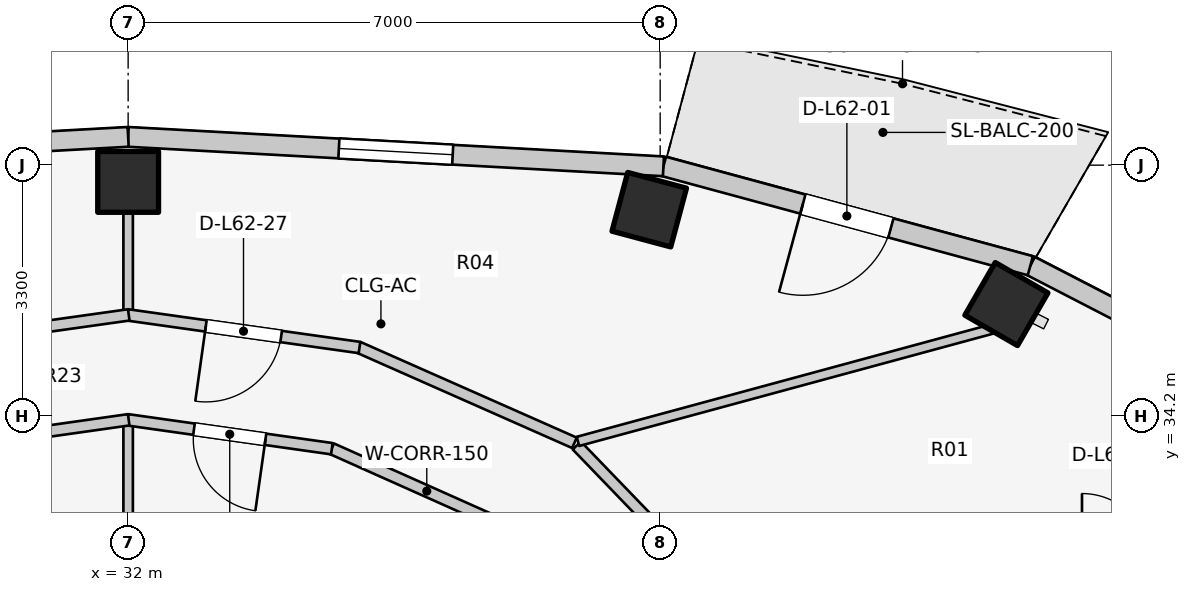
"""IFC4 building model, lengths in metres.
Left out: names, types, materials, properties, quantities, classifications, styles, units other than length and angle.
Written with IfcOpenShell. Run it as: python <this file> out.ifc"""

import sys

from ifc_helpers import new_model, si_unit, direction, frame, frame_2d, origin, origin_2d, place, context, subcontext, project, spatial, rectangle, extrude, element, fill, save


model = new_model("IFC4")
c1 = context("Model", 3, precision=1e-05, world=origin(), true_north=direction((0.0, 1.0)))
c2 = subcontext(c1, "Body", "Model", "MODEL_VIEW")
j1 = project(units=[si_unit("LENGTHUNIT", "METRE"), si_unit("PLANEANGLEUNIT", "RADIAN")], contexts=[c1])
p1 = place(None, origin())
s1 = spatial("IfcSite", under=j1, at=p1, CompositionType="ELEMENT")
p2 = place(p1, origin())
s2 = spatial("IfcBuilding", under=s1, at=p2, CompositionType="ELEMENT")
p3 = place(p2, frame((0.0, 0.0, 204.7)))
s3 = spatial("IfcBuildingStorey", under=s2, at=p3, CompositionType="ELEMENT", Elevation=204.7)
for number, where, z_axis, x_axis in (
    (1, (43.555, 35.673, 0.0), (0.0, 0.0, 1.0), (0.5, 0.866, 0.0)),
    (2, (38.856, 36.914, 0.0), (0.0, 0.0, 1.0), (0.259, 0.966, 0.0)),
    (3, (32.0, 37.28, 0.0), (0.0, 0.0, 1.0), (0.0, 1.0, 0.0)),
):
    element("IfcColumn", number, at=place(p3, frame(where, z_axis=z_axis, x_axis=x_axis)), inside=s3, PredefinedType="COLUMN", context=c2, shape_type="SweptSolid", body=[
        extrude(rectangle(XDim=0.8, YDim=0.8, at=origin_2d()), origin(), (0.0, 0.0, 1.0), 3.1),
    ])
p4 = place(p3, frame((47.558, 34.272, 0.0), z_axis=(0.0, 0.0, 1.0), x_axis=(-0.88849146803, 0.458893137057, 0.0)))
e4 = element("IfcWall", 4, at=p4, inside=s3, PredefinedType="STANDARD", context=c2, shape_type="SweptSolid", body=[
    extrude(rectangle(XDim=4.15, YDim=0.26, at=frame_2d((2.075, 0.0))), origin(), (0.0, 0.0, 1.0), 2.85),
])
p5 = place(p3, frame((43.87, 36.177, 0.0), z_axis=(0.0, 0.0, 1.0), x_axis=(-0.965213026382, 0.261464746576, 0.0)))
e5 = element("IfcWall", 5, at=p5, inside=s3, PredefinedType="STANDARD", context=c2, shape_type="SweptSolid", body=[
    extrude(rectangle(XDim=5.001, YDim=0.26, at=frame_2d((2.5, 0.0))), origin(), (0.0, 0.0, 1.0), 2.88),
])
p6 = place(p5, frame((1.9, 0.0, 0.0)))
e6 = element("IfcOpeningElement", 6, at=p6, cuts=e5, PredefinedType="OPENING", context=c2, shape_type="SweptSolid", body=[
    extrude(rectangle(XDim=1.2, YDim=2.2, at=frame_2d((0.6, 1.1))), frame((0.0, 0.14, 0.0), z_axis=(0.0, -1.0, 0.0), x_axis=(1.0, 0.0, 0.0)), (0.0, 0.0, 1.0), 0.28),
])
p7 = place(p3, frame((39.043, 37.485, 0.0), z_axis=(0.0, 0.0, 1.0), x_axis=(-0.998490239527, 0.054929423535, 0.0)))
e7 = element("IfcWall", 7, at=p7, inside=s3, PredefinedType="STANDARD", context=c2, shape_type="SweptSolid", body=[
    extrude(rectangle(XDim=7.054, YDim=0.26, at=frame_2d((3.527, 0.0))), origin(), (0.0, 0.0, 1.0), 2.85),
])
p8 = place(p7, frame((2.777, 0.0, 0.75)))
e8 = element("IfcOpeningElement", 8, at=p8, cuts=e7, PredefinedType="OPENING", context=c2, shape_type="SweptSolid", body=[
    extrude(rectangle(XDim=1.5, YDim=1.6, at=frame_2d((0.75, 0.8))), frame((0.0, 0.14, 0.0), z_axis=(0.0, -1.0, 0.0), x_axis=(1.0, 0.0, 0.0)), (0.0, 0.0, 1.0), 0.28),
])
p9 = place(p3, frame((32.0, 37.872, 0.0), z_axis=(0.0, 0.0, 1.0), x_axis=(-0.998490239527, -0.054929423535, 0.0)))
e9 = element("IfcWall", 9, at=p9, inside=s3, PredefinedType="STANDARD", context=c2, shape_type="SweptSolid", body=[
    extrude(rectangle(XDim=7.054, YDim=0.26, at=frame_2d((3.527, 0.0))), origin(), (0.0, 0.0, 1.0), 2.85),
])
p10 = place(p9, frame((2.777, 0.0, 0.75)))
e10 = element("IfcOpeningElement", 10, at=p10, cuts=e9, PredefinedType="OPENING", context=c2, shape_type="SweptSolid", body=[
    extrude(rectangle(XDim=1.5, YDim=1.6, at=frame_2d((0.75, 0.8))), frame((0.0, 0.14, 0.0), z_axis=(0.0, -1.0, 0.0), x_axis=(1.0, 0.0, 0.0)), (0.0, 0.0, 1.0), 0.28),
])
p11 = place(p3, frame((32.0, 31.1, 0.0), z_axis=(0.0, 0.0, 1.0), x_axis=(0.0, 1.0, 0.0)))
e11 = element("IfcWall", 11, at=p11, inside=s3, PredefinedType="PARTITIONING", context=c2, shape_type="SweptSolid", body=[
    extrude(rectangle(XDim=3.05, YDim=0.125, at=frame_2d((1.525, 0.0))), origin(), (0.0, 0.0, 1.0), 2.376),
])
p12 = place(p3, frame((37.181, 32.652, 0.0), z_axis=(0.0, 0.0, 1.0), x_axis=(-0.913120130558, 0.407690602257, 0.0)))
e12 = element("IfcWall", 12, at=p12, inside=s3, PredefinedType="PARTITIONING", context=c2, shape_type="SweptSolid", body=[
    extrude(rectangle(XDim=2.743, YDim=0.15, at=frame_2d((1.371, 0.0))), origin(), (0.0, 0.0, 1.0), 2.376),
])
p13 = place(p3, frame((34.68, 33.77, 0.0), z_axis=(0.0, 0.0, 1.0), x_axis=(-0.990132151456, 0.140136799779, 0.0)))
e13 = element("IfcWall", 13, at=p13, inside=s3, PredefinedType="PARTITIONING", context=c2, shape_type="SweptSolid", body=[
    extrude(rectangle(XDim=2.714, YDim=0.15, at=frame_2d((1.357, 0.0))), origin(), (0.0, 0.0, 1.0), 2.376),
])
p14 = place(p13, frame((0.882, 0.0, 0.0)))
e14 = element("IfcOpeningElement", 14, at=p14, cuts=e13, PredefinedType="OPENING", context=c2, shape_type="SweptSolid", body=[
    extrude(rectangle(XDim=0.95, YDim=2.1, at=frame_2d((0.475, 1.05))), frame((0.0, 0.085, 0.0), z_axis=(0.0, -1.0, 0.0), x_axis=(1.0, 0.0, 0.0)), (0.0, 0.0, 1.0), 0.17),
])
p15 = place(p3, frame((32.007, 34.15, 0.0), z_axis=(0.0, 0.0, 1.0), x_axis=(-0.990132151456, -0.140136799779, 0.0)))
e15 = element("IfcWall", 15, at=p15, inside=s3, PredefinedType="PARTITIONING", context=c2, shape_type="SweptSolid", body=[
    extrude(rectangle(XDim=2.714, YDim=0.15, at=frame_2d((1.357, 0.0))), origin(), (0.0, 0.0, 1.0), 2.376),
])
p16 = place(p3, frame((37.903, 33.812, 0.0), z_axis=(0.0, 0.0, 1.0), x_axis=(0.694032962553, -0.719943224768, 0.0)))
e16 = element("IfcWall", 16, at=p16, inside=s3, PredefinedType="PARTITIONING", context=c2, shape_type="SweptSolid", body=[
    extrude(rectangle(XDim=2.158, YDim=0.15, at=frame_2d((1.079, 0.0))), origin(), (0.0, 0.0, 1.0), 2.376),
])
p17 = place(p3, frame((37.918, 33.866, 0.0), z_axis=(0.0, 0.0, 1.0), x_axis=(0.965109390289, 0.261847025523, 0.0)))
e17 = element("IfcWall", 17, at=p17, inside=s3, PredefinedType="PARTITIONING", context=c2, shape_type="SweptSolid", body=[
    extrude(rectangle(XDim=5.644, YDim=0.125, at=frame_2d((2.822, 0.0))), origin(), (0.0, 0.0, 1.0), 2.376),
])
p18 = place(p3, frame((32.0, 35.585, 0.0), z_axis=(0.0, 0.0, 1.0), x_axis=(0.0, 1.0, 0.0)))
e18 = element("IfcWall", 18, at=p18, inside=s3, PredefinedType="PARTITIONING", context=c2, shape_type="SweptSolid", body=[
    extrude(rectangle(XDim=1.315, YDim=0.125, at=frame_2d((0.657, 0.0))), origin(), (0.0, 0.0, 1.0), 2.376),
])
p19 = place(p3, frame((37.872, 33.847, 0.0), z_axis=(0.0, 0.0, 1.0), x_axis=(-0.914490094652, 0.40460828808, 0.0)))
e19 = element("IfcWall", 19, at=p19, inside=s3, PredefinedType="PARTITIONING", context=c2, shape_type="SweptSolid", body=[
    extrude(rectangle(XDim=3.11, YDim=0.15, at=frame_2d((1.555, 0.0))), origin(), (0.0, 0.0, 1.0), 2.376),
])
p20 = place(p3, frame((35.044, 35.101, 0.0), z_axis=(0.0, 0.0, 1.0), x_axis=(-0.990257602807, 0.139247549651, 0.0)))
e20 = element("IfcWall", 20, at=p20, inside=s3, PredefinedType="PARTITIONING", context=c2, shape_type="SweptSolid", body=[
    extrude(rectangle(XDim=3.082, YDim=0.15, at=frame_2d((1.541, 0.0))), origin(), (0.0, 0.0, 1.0), 2.376),
])
p21 = place(p20, frame((1.041, 0.0, 0.0)))
e21 = element("IfcOpeningElement", 21, at=p21, cuts=e20, PredefinedType="OPENING", context=c2, shape_type="SweptSolid", body=[
    extrude(rectangle(XDim=1.0, YDim=2.1, at=frame_2d((0.5, 1.05))), frame((0.0, 0.085, 0.0), z_axis=(0.0, -1.0, 0.0), x_axis=(1.0, 0.0, 0.0)), (0.0, 0.0, 1.0), 0.17),
])
p22 = place(p3, frame((32.008, 35.53, 0.0), z_axis=(0.0, 0.0, 1.0), x_axis=(-0.990257602807, -0.139247549651, 0.0)))
e22 = element("IfcWall", 22, at=p22, inside=s3, PredefinedType="PARTITIONING", context=c2, shape_type="SweptSolid", body=[
    extrude(rectangle(XDim=3.082, YDim=0.15, at=frame_2d((1.541, 0.0))), origin(), (0.0, 0.0, 1.0), 2.376),
])
p23 = place(p6, origin())
e23 = element("IfcDoor", 23, at=p23, inside=s3, OperationType="SINGLE_SWING_RIGHT", PredefinedType="DOOR", context=c2, shape_type="SweptSolid", body=[
    extrude(rectangle(XDim=1.2, YDim=2.2, at=frame_2d((0.6, 1.1))), frame((0.0, 0.025, 0.0), z_axis=(0.0, -1.0, 0.0), x_axis=(1.0, 0.0, 0.0)), (0.0, 0.0, 1.0), 0.05),
])
fill(e6, e23)
p24 = place(p8, origin())
e24 = element("IfcWindow", 24, at=p24, inside=s3, PartitioningType="SINGLE_PANEL", PredefinedType="WINDOW", context=c2, shape_type="SweptSolid", body=[
    extrude(rectangle(XDim=1.5, YDim=1.6, at=frame_2d((0.75, 0.8))), frame((0.0, 0.03, 0.0), z_axis=(0.0, -1.0, 0.0), x_axis=(1.0, 0.0, 0.0)), (0.0, 0.0, 1.0), 0.06),
])
fill(e8, e24)
p25 = place(p14, origin())
e25 = element("IfcDoor", 25, at=p25, inside=s3, OperationType="SINGLE_SWING_LEFT", PredefinedType="DOOR", context=c2, shape_type="SweptSolid", body=[
    extrude(rectangle(XDim=0.95, YDim=2.1, at=frame_2d((0.475, 1.05))), frame((0.0, 0.025, 0.0), z_axis=(0.0, -1.0, 0.0), x_axis=(1.0, 0.0, 0.0)), (0.0, 0.0, 1.0), 0.05),
])
fill(e14, e25)
p26 = place(p21, origin())
e26 = element("IfcDoor", 26, at=p26, inside=s3, OperationType="SINGLE_SWING_RIGHT", PredefinedType="DOOR", context=c2, shape_type="SweptSolid", body=[
    extrude(rectangle(XDim=1.0, YDim=2.1, at=frame_2d((0.5, 1.05))), frame((0.0, 0.025, 0.0), z_axis=(0.0, -1.0, 0.0), x_axis=(1.0, 0.0, 0.0)), (0.0, 0.0, 1.0), 0.05),
])
fill(e21, e26)
save(model, sys.argv[1])
